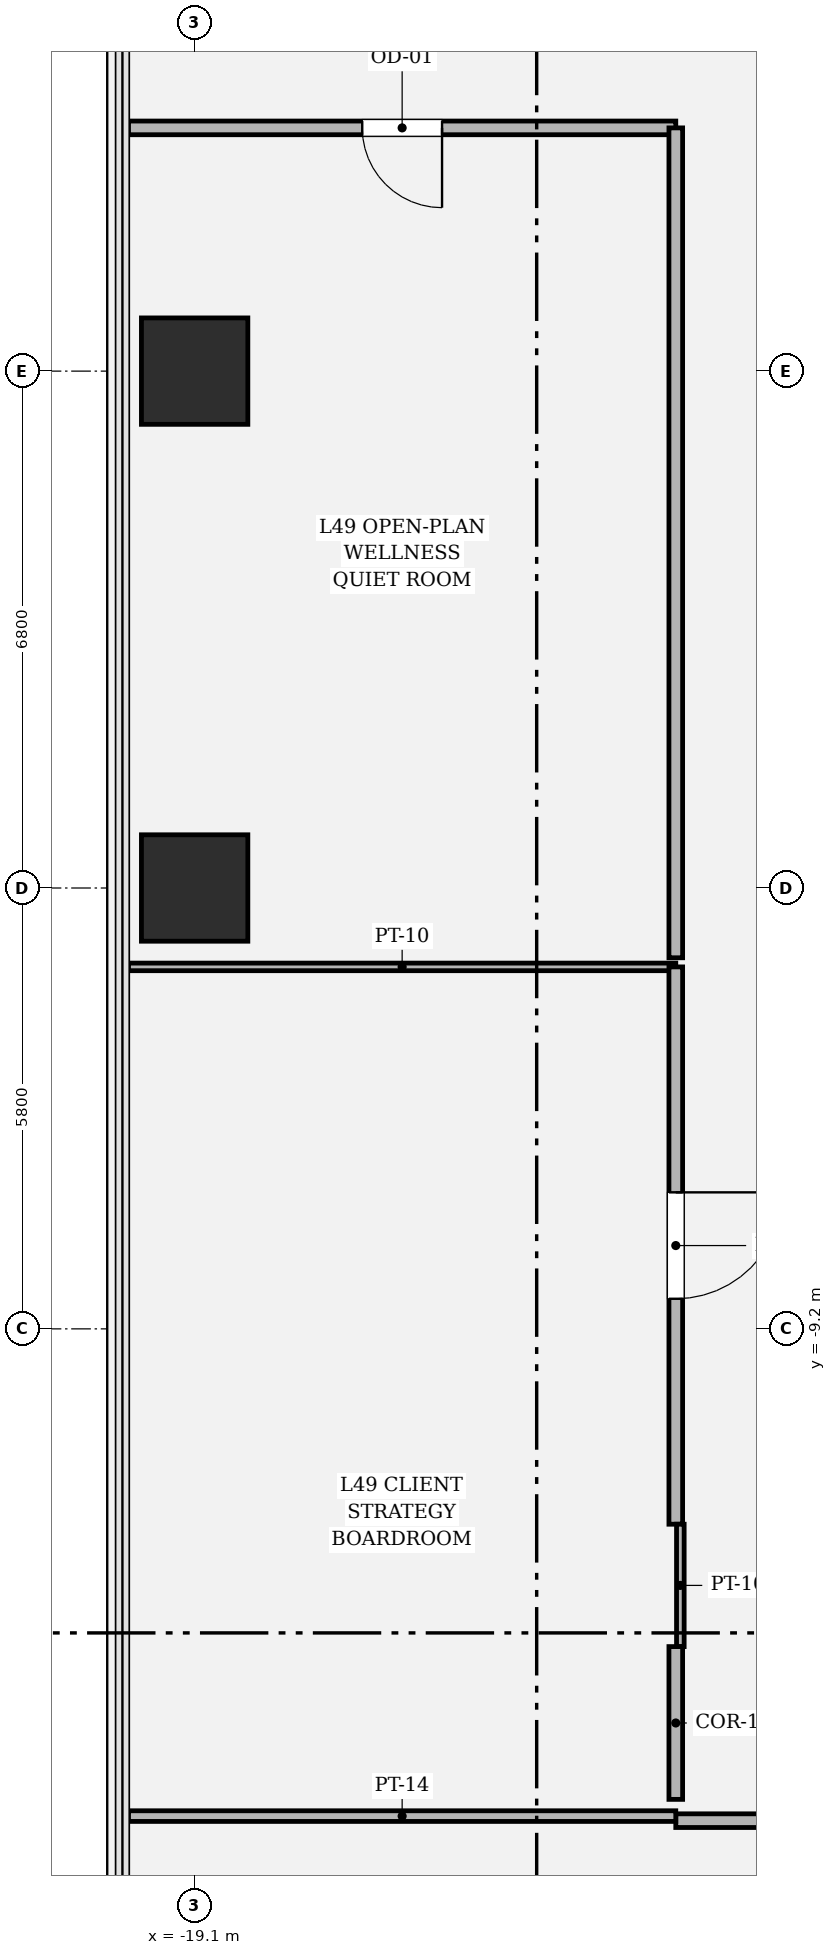
"""IFC4 building model, lengths in metres.
Left out: names, types, materials, properties, quantities, classifications, styles, units other than length and angle.
Written with IfcOpenShell. Run it as: python <this file> out.ifc"""

import sys

from ifc_helpers import new_model, si_unit, direction, frame, frame_2d, origin, origin_2d, place, context, subcontext, project, spatial, rectangle, hollow_rectangle, extrude, element, fill, save


model = new_model("IFC4")
c1 = context("Model", 3, precision=1e-05, world=origin(), true_north=direction((0.0, 1.0)))
c2 = subcontext(c1, "Body", "Model", "MODEL_VIEW")
j1 = project(units=[si_unit("LENGTHUNIT", "METRE"), si_unit("PLANEANGLEUNIT", "RADIAN")], contexts=[c1])
p1 = place(None, origin())
s1 = spatial("IfcSite", under=j1, at=p1, CompositionType="ELEMENT")
p2 = place(p1, origin())
s2 = spatial("IfcBuilding", under=s1, at=p2, CompositionType="ELEMENT")
p3 = place(p2, frame((0.0, 0.0, 208.65)))
s3 = spatial("IfcBuildingStorey", under=s2, at=p3, CompositionType="ELEMENT", Elevation=208.65)
for number, where, z_axis, x_axis in (
    (1, (-19.1, 3.4, 0.0), (0.0, 0.0, 1.0), (1.0, 0.0, 0.0)),
    (2, (-19.1, -3.4, 0.0), (0.0, 0.0, 1.0), (1.0, 0.0, 0.0)),
):
    element("IfcColumn", number, at=place(p3, frame(where, z_axis=z_axis, x_axis=x_axis)), inside=s3, PredefinedType="COLUMN", context=c2, shape_type="SweptSolid", body=[
        extrude(hollow_rectangle(XDim=1.4, YDim=1.4, WallThickness=0.042, at=origin_2d()), origin(), (0.0, 0.0, 1.0), 4.05),
    ])
p4 = place(p3, frame((-12.77, -15.67, 0.0), z_axis=(0.0, 0.0, 1.0), x_axis=(1.0, 0.0, 0.0)))
e3 = element("IfcWall", 3, at=p4, inside=s3, PredefinedType="PARTITIONING", context=c2, shape_type="SweptSolid", body=[
    extrude(rectangle(XDim=10.943, YDim=0.18, at=frame_2d((5.472, 0.0))), origin(), (0.0, 0.0, 1.0), 3.174),
])
p5 = place(p4, frame((4.947, 0.0, 0.0)))
e4 = element("IfcOpeningElement", 4, at=p5, cuts=e3, PredefinedType="OPENING", context=c2, shape_type="SweptSolid", body=[
    extrude(rectangle(XDim=1.05, YDim=2.2, at=frame_2d((0.525, 1.1))), frame((0.0, 0.1, 0.0), z_axis=(0.0, -1.0, 0.0), x_axis=(1.0, 0.0, 0.0)), (0.0, 0.0, 1.0), 0.2),
])
p6 = place(p3, frame((-19.97, -15.61, 0.0), z_axis=(0.0, 0.0, 1.0), x_axis=(1.0, 0.0, 0.0)))
e5 = element("IfcWall", 5, at=p6, inside=s3, PredefinedType="PARTITIONING", context=c2, shape_type="SweptSolid", body=[
    extrude(rectangle(XDim=7.2, YDim=0.14, at=frame_2d((3.6, 0.0))), origin(), (0.0, 0.0, 1.0), 3.174),
])
p7 = place(p3, frame((-19.97, -4.438, 0.0), z_axis=(0.0, 0.0, 1.0), x_axis=(1.0, 0.0, 0.0)))
e6 = element("IfcWall", 6, at=p7, inside=s3, PredefinedType="PARTITIONING", context=c2, shape_type="SweptSolid", body=[
    extrude(rectangle(XDim=7.2, YDim=0.1, at=frame_2d((3.6, 0.0))), origin(), (0.0, 0.0, 1.0), 3.174),
])
p8 = place(p3, frame((-12.77, -4.438, 0.0), z_axis=(0.0, 0.0, 1.0), x_axis=(0.0, -1.0, 0.0)))
e7 = element("IfcWall", 7, at=p8, inside=s3, PredefinedType="PARTITIONING", context=c2, shape_type="SweptSolid", body=[
    extrude(rectangle(XDim=7.332, YDim=0.18, at=frame_2d((3.666, 0.0))), origin(), (0.0, 0.0, 1.0), 3.174),
])
p9 = place(p8, frame((2.966, 0.0, 0.0)))
e8 = element("IfcOpeningElement", 8, at=p9, cuts=e7, PredefinedType="OPENING", context=c2, shape_type="SweptSolid", body=[
    extrude(rectangle(XDim=1.4, YDim=2.25, at=frame_2d((0.7, 1.125))), frame((0.0, 0.1, 0.0), z_axis=(0.0, -1.0, 0.0), x_axis=(1.0, 0.0, 0.0)), (0.0, 0.0, 1.0), 0.2),
])
p10 = place(p3, frame((-12.71, -11.77, 0.0), z_axis=(0.0, 0.0, 1.0), x_axis=(0.0, -1.0, 0.0)))
e9 = element("IfcWall", 9, at=p10, inside=s3, PredefinedType="PARTITIONING", context=c2, shape_type="SweptSolid", body=[
    extrude(rectangle(XDim=1.61, YDim=0.1, at=frame_2d((0.805, 0.0))), origin(), (0.0, 0.0, 1.0), 3.424),
])
p11 = place(p3, frame((-12.77, -13.38, 0.0), z_axis=(0.0, 0.0, 1.0), x_axis=(0.0, -1.0, 0.0)))
e10 = element("IfcWall", 10, at=p11, inside=s3, PredefinedType="PARTITIONING", context=c2, shape_type="SweptSolid", body=[
    extrude(rectangle(XDim=2.01, YDim=0.18, at=frame_2d((1.005, 0.0))), origin(), (0.0, 0.0, 1.0), 3.424),
])
p12 = place(p3, frame((-19.97, 6.6, 0.0), z_axis=(0.0, 0.0, 1.0), x_axis=(1.0, 0.0, 0.0)))
e11 = element("IfcWall", 11, at=p12, inside=s3, PredefinedType="PARTITIONING", context=c2, shape_type="SweptSolid", body=[
    extrude(rectangle(XDim=7.2, YDim=0.18, at=frame_2d((3.6, 0.0))), origin(), (0.0, 0.0, 1.0), 3.174),
])
p13 = place(p12, frame((3.075, 0.0, 0.0)))
e12 = element("IfcOpeningElement", 12, at=p13, cuts=e11, PredefinedType="OPENING", context=c2, shape_type="SweptSolid", body=[
    extrude(rectangle(XDim=1.05, YDim=2.2, at=frame_2d((0.525, 1.1))), frame((0.0, 0.1, 0.0), z_axis=(0.0, -1.0, 0.0), x_axis=(1.0, 0.0, 0.0)), (0.0, 0.0, 1.0), 0.2),
])
p14 = place(p3, frame((-12.77, 6.6, 0.0), z_axis=(0.0, 0.0, 1.0), x_axis=(0.0, -1.0, 0.0)))
e13 = element("IfcWall", 13, at=p14, inside=s3, PredefinedType="PARTITIONING", context=c2, shape_type="SweptSolid", body=[
    extrude(rectangle(XDim=10.918, YDim=0.18, at=frame_2d((5.459, 0.0))), origin(), (0.0, 0.0, 1.0), 3.174),
])
p15 = place(p9, origin())
e14 = element("IfcDoor", 14, at=p15, inside=s3, OperationType="SINGLE_SWING_LEFT", PredefinedType="DOOR", context=c2, shape_type="SweptSolid", body=[
    extrude(rectangle(XDim=1.4, YDim=2.25, at=frame_2d((0.7, 1.125))), frame((0.0, 0.025, 0.0), z_axis=(0.0, -1.0, 0.0), x_axis=(1.0, 0.0, 0.0)), (0.0, 0.0, 1.0), 0.05),
])
fill(e8, e14)
p16 = place(p13, origin())
e15 = element("IfcDoor", 15, at=p16, inside=s3, OperationType="SINGLE_SWING_RIGHT", PredefinedType="DOOR", context=c2, shape_type="SweptSolid", body=[
    extrude(rectangle(XDim=1.05, YDim=2.2, at=frame_2d((0.525, 1.1))), frame((0.0, 0.025, 0.0), z_axis=(0.0, -1.0, 0.0), x_axis=(1.0, 0.0, 0.0)), (0.0, 0.0, 1.0), 0.05),
])
fill(e12, e15)
save(model, sys.argv[1])
